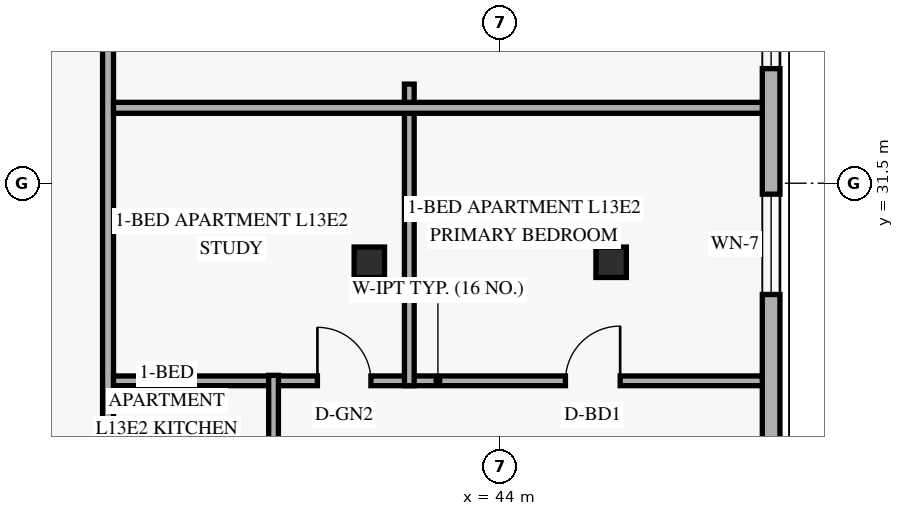
"""IFC4 building model, lengths in metres.
Left out: names, types, materials, properties, quantities, classifications, styles, units other than length and angle.
Written with IfcOpenShell. Run it as: python <this file> out.ifc"""

import sys

from ifc_helpers import new_model, si_unit, direction, frame, frame_2d, origin, origin_2d, place, context, subcontext, project, spatial, rectangle, hollow_rectangle, extrude, element, fill, save


model = new_model("IFC4")
c1 = context("Model", 3, precision=1e-05, world=origin(), true_north=direction((0.0, 1.0)))
c2 = subcontext(c1, "Body", "Model", "MODEL_VIEW")
j1 = project(units=[si_unit("LENGTHUNIT", "METRE"), si_unit("PLANEANGLEUNIT", "RADIAN")], contexts=[c1])
p1 = place(None, origin())
s1 = spatial("IfcSite", under=j1, at=p1, CompositionType="ELEMENT")
p2 = place(p1, origin())
s2 = spatial("IfcBuilding", under=s1, at=p2, CompositionType="ELEMENT")
p3 = place(p2, frame((0.0, 0.0, 52.8)))
s3 = spatial("IfcBuildingStorey", under=s2, at=p3, CompositionType="ELEMENT", Elevation=52.8)
p4 = place(p3, frame((41.784, 30.2, 0.0), z_axis=(0.034973505036, 0.0, 0.999388239847), x_axis=(0.0, 1.0, 0.0)))
e1 = element("IfcColumn", 1, at=p4, inside=s3, PredefinedType="COLUMN", context=c2, shape_type="SweptSolid", body=[
    extrude(hollow_rectangle(XDim=0.5, YDim=0.5, WallThickness=0.022, at=origin_2d()), origin(), (0.0, 0.0, 1.0), 3.602),
])
p5 = place(p3, frame((45.719, 30.2, 0.0), z_axis=(0.057888518877, 0.0, 0.998323053617), x_axis=(0.0, 1.0, 0.0)))
e2 = element("IfcColumn", 2, at=p5, inside=s3, PredefinedType="COLUMN", context=c2, shape_type="SweptSolid", body=[
    extrude(hollow_rectangle(XDim=0.5, YDim=0.5, WallThickness=0.022, at=origin_2d()), origin(), (0.0, 0.0, 1.0), 3.606),
])
p6 = place(p3, frame((48.455, 4.62, 0.0), z_axis=(0.0, 0.0, 1.0), x_axis=(0.0, 1.0, 0.0)))
e3 = element("IfcWall", 3, at=p6, inside=s3, PredefinedType="SOLIDWALL", context=c2, shape_type="SweptSolid", body=[
    extrude(rectangle(XDim=38.76, YDim=0.29, at=frame_2d((19.38, 0.0))), origin(), (0.0, 0.0, 1.0), 3.36),
])
p7 = place(p6, frame((5.415, 0.0, 0.85)))
e4 = element("IfcOpeningElement", 4, at=p7, cuts=e3, PredefinedType="OPENING", context=c2, shape_type="SweptSolid", body=[
    extrude(rectangle(XDim=1.65, YDim=1.6, at=frame_2d((0.825, 0.8))), frame((0.0, 0.155, 0.0), z_axis=(0.0, -1.0, 0.0), x_axis=(1.0, 0.0, 0.0)), (0.0, 0.0, 1.0), 0.31),
])
p8 = place(p6, frame((13.559, 0.0, 0.85)))
e5 = element("IfcOpeningElement", 5, at=p8, cuts=e3, PredefinedType="OPENING", context=c2, shape_type="SweptSolid", body=[
    extrude(rectangle(XDim=1.65, YDim=1.6, at=frame_2d((0.825, 0.8))), frame((0.0, 0.155, 0.0), z_axis=(0.0, -1.0, 0.0), x_axis=(1.0, 0.0, 0.0)), (0.0, 0.0, 1.0), 0.31),
])
p9 = place(p6, frame((19.134, 0.0, 0.85)))
e6 = element("IfcOpeningElement", 6, at=p9, cuts=e3, PredefinedType="OPENING", context=c2, shape_type="SweptSolid", body=[
    extrude(rectangle(XDim=1.65, YDim=1.6, at=frame_2d((0.825, 0.8))), frame((0.0, 0.155, 0.0), z_axis=(0.0, -1.0, 0.0), x_axis=(1.0, 0.0, 0.0)), (0.0, 0.0, 1.0), 0.31),
])
p10 = place(p6, frame((25.05, 0.0, 0.85)))
e7 = element("IfcOpeningElement", 7, at=p10, cuts=e3, PredefinedType="OPENING", context=c2, shape_type="SweptSolid", body=[
    extrude(rectangle(XDim=1.65, YDim=1.6, at=frame_2d((0.825, 0.8))), frame((0.0, 0.155, 0.0), z_axis=(0.0, -1.0, 0.0), x_axis=(1.0, 0.0, 0.0)), (0.0, 0.0, 1.0), 0.31),
])
p11 = place(p6, frame((28.764, 0.0, 0.85)))
e8 = element("IfcOpeningElement", 8, at=p11, cuts=e3, PredefinedType="OPENING", context=c2, shape_type="SweptSolid", body=[
    extrude(rectangle(XDim=1.65, YDim=1.6, at=frame_2d((0.825, 0.8))), frame((0.0, 0.155, 0.0), z_axis=(0.0, -1.0, 0.0), x_axis=(1.0, 0.0, 0.0)), (0.0, 0.0, 1.0), 0.31),
])
p12 = place(p6, frame((33.824, 0.0, 0.85)))
e9 = element("IfcOpeningElement", 9, at=p12, cuts=e3, PredefinedType="OPENING", context=c2, shape_type="SweptSolid", body=[
    extrude(rectangle(XDim=1.65, YDim=1.6, at=frame_2d((0.825, 0.8))), frame((0.0, 0.155, 0.0), z_axis=(0.0, -1.0, 0.0), x_axis=(1.0, 0.0, 0.0)), (0.0, 0.0, 1.0), 0.31),
])
p13 = place(p3, frame((37.55, 1.29, 0.0), z_axis=(0.0, 0.0, 1.0), x_axis=(0.0, 1.0, 0.0)))
e10 = element("IfcWall", 10, at=p13, inside=s3, PredefinedType="STANDARD", context=c2, shape_type="SweptSolid", body=[
    extrude(rectangle(XDim=45.42, YDim=0.18, at=frame_2d((22.71, 0.0))), origin(), (0.0, 0.0, 1.0), 2.649),
])
p14 = place(p13, frame((9.87, 0.0, 0.0)))
e11 = element("IfcOpeningElement", 11, at=p14, cuts=e10, PredefinedType="OPENING", context=c2, shape_type="SweptSolid", body=[
    extrude(rectangle(XDim=0.92, YDim=2.15, at=frame_2d((0.46, 1.075))), frame((0.0, 0.1, 0.0), z_axis=(0.0, -1.0, 0.0), x_axis=(1.0, 0.0, 0.0)), (0.0, 0.0, 1.0), 0.2),
])
p15 = place(p13, frame((20.953, 0.0, 0.0)))
e12 = element("IfcOpeningElement", 12, at=p15, cuts=e10, PredefinedType="OPENING", context=c2, shape_type="SweptSolid", body=[
    extrude(rectangle(XDim=0.92, YDim=2.15, at=frame_2d((0.46, 1.075))), frame((0.0, 0.1, 0.0), z_axis=(0.0, -1.0, 0.0), x_axis=(1.0, 0.0, 0.0)), (0.0, 0.0, 1.0), 0.2),
])
p16 = place(p13, frame((35.534, 0.0, 0.0)))
e13 = element("IfcOpeningElement", 13, at=p16, cuts=e10, PredefinedType="OPENING", context=c2, shape_type="SweptSolid", body=[
    extrude(rectangle(XDim=0.92, YDim=2.15, at=frame_2d((0.46, 1.075))), frame((0.0, 0.1, 0.0), z_axis=(0.0, -1.0, 0.0), x_axis=(1.0, 0.0, 0.0)), (0.0, 0.0, 1.0), 0.2),
])
p17 = place(p3, frame((37.64, 28.25, 0.0), z_axis=(0.0, 0.0, 1.0), x_axis=(1.0, 0.0, 0.0)))
e14 = element("IfcWall", 14, at=p17, inside=s3, PredefinedType="PARTITIONING", context=c2, shape_type="SweptSolid", body=[
    extrude(rectangle(XDim=10.67, YDim=0.16, at=frame_2d((5.335, 0.0))), origin(), (0.0, 0.0, 1.0), 2.649),
])
p18 = place(p17, frame((3.353, 0.0, 0.0)))
e15 = element("IfcOpeningElement", 15, at=p18, cuts=e14, PredefinedType="OPENING", context=c2, shape_type="SweptSolid", body=[
    extrude(rectangle(XDim=0.88, YDim=2.12, at=frame_2d((0.44, 1.06))), frame((0.0, 0.09, 0.0), z_axis=(0.0, -1.0, 0.0), x_axis=(1.0, 0.0, 0.0)), (0.0, 0.0, 1.0), 0.18),
])
p19 = place(p17, frame((7.432, 0.0, 0.0)))
e16 = element("IfcOpeningElement", 16, at=p19, cuts=e14, PredefinedType="OPENING", context=c2, shape_type="SweptSolid", body=[
    extrude(rectangle(XDim=0.9, YDim=2.14, at=frame_2d((0.45, 1.07))), frame((0.0, 0.09, 0.0), z_axis=(0.0, -1.0, 0.0), x_axis=(1.0, 0.0, 0.0)), (0.0, 0.0, 1.0), 0.18),
])
p20 = place(p3, frame((40.272, 23.453, 0.0), z_axis=(0.0, 0.0, 1.0), x_axis=(0.0, 1.0, 0.0)))
e17 = element("IfcWall", 17, at=p20, inside=s3, PredefinedType="PLUMBINGWALL", context=c2, shape_type="SweptSolid", body=[
    extrude(rectangle(XDim=4.887, YDim=0.16, at=frame_2d((2.444, 0.0))), origin(), (0.0, 0.0, 1.0), 3.36),
])
p21 = place(p20, frame((0.42, 0.0, 0.0)))
e18 = element("IfcOpeningElement", 18, at=p21, cuts=e17, PredefinedType="OPENING", context=c2, shape_type="SweptSolid", body=[
    extrude(rectangle(XDim=0.86, YDim=2.12, at=frame_2d((0.43, 1.06))), frame((0.0, 0.09, 0.0), z_axis=(0.0, -1.0, 0.0), x_axis=(1.0, 0.0, 0.0)), (0.0, 0.0, 1.0), 0.18),
])
p22 = place(p20, frame((2.585, 0.0, 0.0)))
e19 = element("IfcOpeningElement", 19, at=p22, cuts=e17, PredefinedType="OPENING", context=c2, shape_type="SweptSolid", body=[
    extrude(rectangle(XDim=0.88, YDim=2.12, at=frame_2d((0.44, 1.06))), frame((0.0, 0.09, 0.0), z_axis=(0.0, -1.0, 0.0), x_axis=(1.0, 0.0, 0.0)), (0.0, 0.0, 1.0), 0.18),
])
p23 = place(p3, frame((42.504, 28.17, 0.0), z_axis=(0.0, 0.0, 1.0), x_axis=(0.0, 1.0, 0.0)))
e20 = element("IfcWall", 20, at=p23, inside=s3, PredefinedType="PARTITIONING", context=c2, shape_type="SweptSolid", body=[
    extrude(rectangle(XDim=4.96, YDim=0.16, at=frame_2d((2.48, 0.0))), origin(), (0.0, 0.0, 1.0), 2.649),
])
p24 = place(p3, frame((37.64, 32.74, 0.0), z_axis=(0.0, 0.0, 1.0), x_axis=(1.0, 0.0, 0.0)))
e21 = element("IfcWall", 21, at=p24, inside=s3, PredefinedType="PARTITIONING", context=c2, shape_type="SweptSolid", body=[
    extrude(rectangle(XDim=10.67, YDim=0.18, at=frame_2d((5.335, 0.0))), origin(), (0.0, 0.0, 1.0), 2.649),
])
p25 = place(p10, origin())
e22 = element("IfcWindow", 22, at=p25, inside=s3, PartitioningType="SINGLE_PANEL", PredefinedType="WINDOW", context=c2, shape_type="SweptSolid", body=[
    extrude(rectangle(XDim=1.65, YDim=1.6, at=frame_2d((0.825, 0.8))), frame((0.0, 0.03, 0.0), z_axis=(0.0, -1.0, 0.0), x_axis=(1.0, 0.0, 0.0)), (0.0, 0.0, 1.0), 0.06),
])
fill(e7, e22)
p26 = place(p11, origin())
e23 = element("IfcWindow", 23, at=p26, inside=s3, PartitioningType="SINGLE_PANEL", PredefinedType="WINDOW", context=c2, shape_type="SweptSolid", body=[
    extrude(rectangle(XDim=1.65, YDim=1.6, at=frame_2d((0.825, 0.8))), frame((0.0, 0.03, 0.0), z_axis=(0.0, -1.0, 0.0), x_axis=(1.0, 0.0, 0.0)), (0.0, 0.0, 1.0), 0.06),
])
fill(e8, e23)
p27 = place(p18, origin())
e24 = element("IfcDoor", 24, at=p27, inside=s3, OperationType="SINGLE_SWING_LEFT", PredefinedType="DOOR", context=c2, shape_type="SweptSolid", body=[
    extrude(rectangle(XDim=0.88, YDim=2.12, at=frame_2d((0.44, 1.06))), frame((0.0, 0.025, 0.0), z_axis=(0.0, -1.0, 0.0), x_axis=(1.0, 0.0, 0.0)), (0.0, 0.0, 1.0), 0.05),
])
fill(e15, e24)
p28 = place(p19, origin())
e25 = element("IfcDoor", 25, at=p28, inside=s3, OperationType="SINGLE_SWING_RIGHT", PredefinedType="DOOR", context=c2, shape_type="SweptSolid", body=[
    extrude(rectangle(XDim=0.9, YDim=2.14, at=frame_2d((0.45, 1.07))), frame((0.0, 0.025, 0.0), z_axis=(0.0, -1.0, 0.0), x_axis=(1.0, 0.0, 0.0)), (0.0, 0.0, 1.0), 0.05),
])
fill(e16, e25)
save(model, sys.argv[1])
